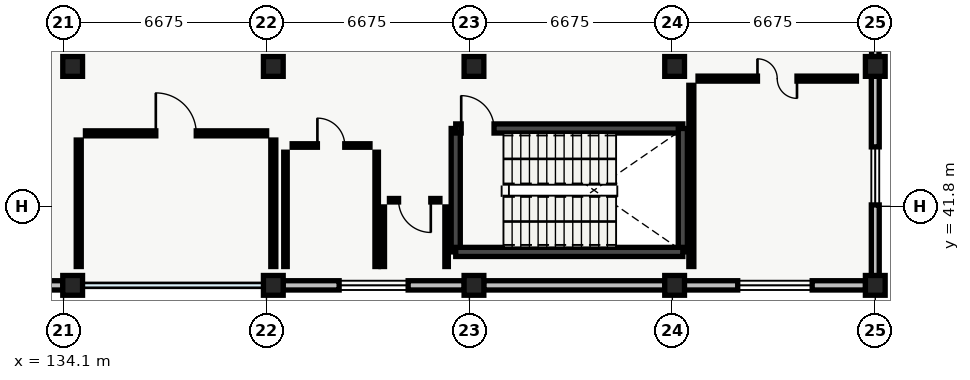
"""IFC4 building model, lengths in metres.
Left out: names, types, materials, properties, quantities, classifications, styles, units other than length and angle.
Written with IfcOpenShell. Run it as: python <this file> out.ifc"""

import sys

from ifc_helpers import new_model, si_unit, direction, frame, frame_2d, origin, origin_2d, place, context, subcontext, project, spatial, rectangle, extrude, element, fill, save


model = new_model("IFC4")
c1 = context("Model", 3, precision=1e-05, world=origin(), true_north=direction((0.0, 1.0)))
c2 = subcontext(c1, "Body", "Model", "MODEL_VIEW")
j1 = project(units=[si_unit("LENGTHUNIT", "METRE"), si_unit("PLANEANGLEUNIT", "RADIAN")], contexts=[c1])
p1 = place(None, origin())
s1 = spatial("IfcSite", under=j1, at=p1, CompositionType="ELEMENT")
p2 = place(p1, origin())
s2 = spatial("IfcBuilding", under=s1, at=p2, CompositionType="ELEMENT")
p3 = place(p2, frame((0.0, 0.0, 18.6)))
s3 = spatial("IfcBuildingStorey", under=s2, at=p3, CompositionType="ELEMENT", Elevation=18.6)
for number, where, z_axis, x_axis in (
    (1, (134.4, 39.2, 0.0), (0.0, 0.0, 1.0), (1.0, 0.0, 0.0)),
    (2, (134.4, 46.4, 0.0), (0.0, 0.0, 1.0), (1.0, 0.0, 0.0)),
    (3, (141.0, 39.2, 0.0), (0.0, 0.0, 1.0), (1.0, 0.0, 0.0)),
    (4, (141.0, 46.4, 0.0), (0.0, 0.0, 1.0), (1.0, 0.0, 0.0)),
    (5, (147.6, 39.2, 0.0), (0.0, 0.0, 1.0), (1.0, 0.0, 0.0)),
    (6, (147.6, 46.4, 0.0), (0.0, 0.0, 1.0), (1.0, 0.0, 0.0)),
    (7, (154.2, 39.2, 0.0), (0.0, 0.0, 1.0), (1.0, 0.0, 0.0)),
    (8, (154.2, 46.4, 0.0), (0.0, 0.0, 1.0), (1.0, 0.0, 0.0)),
    (9, (160.8, 39.2, 0.0), (0.0, 0.0, 1.0), (1.0, 0.0, 0.0)),
    (10, (160.8, 46.4, 0.0), (0.0, 0.0, 1.0), (1.0, 0.0, 0.0)),
):
    element("IfcColumn", number, at=place(p3, frame(where, z_axis=z_axis, x_axis=x_axis)), inside=s3, PredefinedType="COLUMN", context=c2, shape_type="SweptSolid", body=[
        extrude(rectangle(XDim=0.65, YDim=0.65, at=origin_2d()), origin(), (0.0, 0.0, 1.0), 4.3),
    ])
p4 = place(p3, frame((160.8, 53.28, 0.0), z_axis=(0.0, 0.0, 1.0), x_axis=(0.0, -1.0, 0.0)))
e11 = element("IfcWall", 11, at=p4, inside=s3, PredefinedType="STANDARD", context=c2, shape_type="SweptSolid", body=[
    extrude(rectangle(XDim=6.56, YDim=0.245, at=frame_2d((3.28, 0.0))), origin(), (0.0, 0.0, 1.0), 3.835),
])
p5 = place(p4, frame((2.28, 0.0, 0.95)))
e12 = element("IfcOpeningElement", 12, at=p5, cuts=e11, PredefinedType="OPENING", context=c2, shape_type="SweptSolid", body=[
    extrude(rectangle(XDim=2.0, YDim=1.42, at=frame_2d((1.0, 0.71))), frame((0.0, 0.123, 0.0), z_axis=(0.0, -1.0, 0.0), x_axis=(1.0, 0.0, 0.0)), (0.0, 0.0, 1.0), 0.245),
])
p6 = place(p3, frame((160.8, 46.08, 0.0), z_axis=(0.0, 0.0, 1.0), x_axis=(0.0, -1.0, 0.0)))
e13 = element("IfcWall", 13, at=p6, inside=s3, PredefinedType="STANDARD", context=c2, shape_type="SweptSolid", body=[
    extrude(rectangle(XDim=6.56, YDim=0.26, at=frame_2d((3.28, 0.0))), origin(), (0.0, 0.0, 1.0), 3.835),
])
p7 = place(p6, frame((2.325, 0.0, 0.95)))
e14 = element("IfcOpeningElement", 14, at=p7, cuts=e13, PredefinedType="OPENING", context=c2, shape_type="SweptSolid", body=[
    extrude(rectangle(XDim=1.91, YDim=1.4, at=frame_2d((0.955, 0.7))), frame((0.0, 0.13, 0.0), z_axis=(0.0, -1.0, 0.0), x_axis=(1.0, 0.0, 0.0)), (0.0, 0.0, 1.0), 0.26),
])
p8 = place(p3, frame((160.48, 39.2, 0.0), z_axis=(0.0, 0.0, 1.0), x_axis=(-1.0, 0.0, 0.0)))
e15 = element("IfcWall", 15, at=p8, inside=s3, PredefinedType="STANDARD", context=c2, shape_type="SweptSolid", body=[
    extrude(rectangle(XDim=5.96, YDim=0.305, at=frame_2d((2.98, 0.0))), origin(), (0.0, 0.0, 1.0), 3.835),
])
p9 = place(p8, frame((1.755, 0.0, 0.95)))
e16 = element("IfcOpeningElement", 16, at=p9, cuts=e15, PredefinedType="OPENING", context=c2, shape_type="SweptSolid", body=[
    extrude(rectangle(XDim=2.45, YDim=1.38, at=frame_2d((1.225, 0.69))), frame((0.0, 0.152, 0.0), z_axis=(0.0, -1.0, 0.0), x_axis=(1.0, 0.0, 0.0)), (0.0, 0.0, 1.0), 0.305),
])
p10 = place(p3, frame((153.88, 39.2, 0.0), z_axis=(0.0, 0.0, 1.0), x_axis=(-1.0, 0.0, 0.0)))
e17 = element("IfcWall", 17, at=p10, inside=s3, PredefinedType="STANDARD", context=c2, shape_type="SweptSolid", body=[
    extrude(rectangle(XDim=5.96, YDim=0.305, at=frame_2d((2.98, 0.0))), origin(), (0.0, 0.0, 1.0), 3.835),
])
p11 = place(p3, frame((147.28, 39.2, 0.0), z_axis=(0.0, 0.0, 1.0), x_axis=(-1.0, 0.0, 0.0)))
e18 = element("IfcWall", 18, at=p11, inside=s3, PredefinedType="STANDARD", context=c2, shape_type="SweptSolid", body=[
    extrude(rectangle(XDim=5.96, YDim=0.305, at=frame_2d((2.98, 0.0))), origin(), (0.0, 0.0, 1.0), 3.835),
])
p12 = place(p11, frame((1.845, 0.0, 0.95)))
e19 = element("IfcOpeningElement", 19, at=p12, cuts=e18, PredefinedType="OPENING", context=c2, shape_type="SweptSolid", body=[
    extrude(rectangle(XDim=2.27, YDim=1.48, at=frame_2d((1.135, 0.74))), frame((0.0, 0.152, 0.0), z_axis=(0.0, -1.0, 0.0), x_axis=(1.0, 0.0, 0.0)), (0.0, 0.0, 1.0), 0.305),
])
p13 = place(p3, frame((134.08, 39.2, 0.0), z_axis=(0.0, 0.0, 1.0), x_axis=(-1.0, 0.0, 0.0)))
e20 = element("IfcWall", 20, at=p13, inside=s3, PredefinedType="STANDARD", context=c2, shape_type="SweptSolid", body=[
    extrude(rectangle(XDim=5.96, YDim=0.305, at=frame_2d((2.98, 0.0))), origin(), (0.0, 0.0, 1.0), 3.835),
])
p14 = place(p13, frame((1.935, 0.0, 0.95)))
e21 = element("IfcOpeningElement", 21, at=p14, cuts=e20, PredefinedType="OPENING", context=c2, shape_type="SweptSolid", body=[
    extrude(rectangle(XDim=2.09, YDim=1.44, at=frame_2d((1.045, 0.72))), frame((0.0, 0.152, 0.0), z_axis=(0.0, -1.0, 0.0), x_axis=(1.0, 0.0, 0.0)), (0.0, 0.0, 1.0), 0.305),
])
p15 = place(p3, frame((147.0, 40.3, 0.0), z_axis=(0.0, 0.0, 1.0), x_axis=(0.0, 1.0, 0.0)))
e22 = element("IfcWall", 22, at=p15, inside=s3, PredefinedType="SHEAR", context=c2, shape_type="SweptSolid", body=[
    extrude(rectangle(XDim=4.06, YDim=0.3, at=frame_2d((2.03, 0.0))), origin(), (0.0, 0.0, 1.0), 4.28),
])
p16 = place(p3, frame((147.0, 44.36, 0.0), z_axis=(0.0, 0.0, 1.0), x_axis=(1.0, 0.0, 0.0)))
e23 = element("IfcWall", 23, at=p16, inside=s3, PredefinedType="SHEAR", context=c2, shape_type="SweptSolid", body=[
    extrude(rectangle(XDim=7.47, YDim=0.3, at=frame_2d((3.735, 0.0))), origin(), (0.0, 0.0, 1.0), 4.28),
])
p17 = place(p16, frame((0.18, 0.0, 0.0)))
e24 = element("IfcOpeningElement", 24, at=p17, cuts=e23, PredefinedType="OPENING", context=c2, shape_type="SweptSolid", body=[
    extrude(rectangle(XDim=1.08, YDim=2.15, at=frame_2d((0.54, 1.075))), frame((0.0, 0.15, 0.0), z_axis=(0.0, -1.0, 0.0), x_axis=(1.0, 0.0, 0.0)), (0.0, 0.0, 1.0), 0.3),
])
p18 = place(p3, frame((154.47, 44.36, 0.0), z_axis=(0.0, 0.0, 1.0), x_axis=(0.0, -1.0, 0.0)))
e25 = element("IfcWall", 25, at=p18, inside=s3, PredefinedType="SHEAR", context=c2, shape_type="SweptSolid", body=[
    extrude(rectangle(XDim=4.06, YDim=0.3, at=frame_2d((2.03, 0.0))), origin(), (0.0, 0.0, 1.0), 4.28),
])
p19 = place(p3, frame((154.47, 40.3, 0.0), z_axis=(0.0, 0.0, 1.0), x_axis=(-1.0, 0.0, 0.0)))
e26 = element("IfcWall", 26, at=p19, inside=s3, PredefinedType="SHEAR", context=c2, shape_type="SweptSolid", body=[
    extrude(rectangle(XDim=7.47, YDim=0.3, at=frame_2d((3.735, 0.0))), origin(), (0.0, 0.0, 1.0), 4.28),
])
p20 = place(p3, frame((144.4, 39.82, 0.0), z_axis=(0.0, 0.0, 1.0), x_axis=(0.0, 1.0, 0.0)))
e27 = element("IfcWall", 27, at=p20, inside=s3, PredefinedType="PARTITIONING", context=c2, shape_type="SweptSolid", body=[
    extrude(rectangle(XDim=3.76, YDim=0.115, at=frame_2d((1.88, 0.0))), origin(), (0.0, 0.0, 1.0), 3.95),
])
p21 = place(p3, frame((144.18, 43.8, 0.0), z_axis=(0.0, 0.0, 1.0), x_axis=(-1.0, 0.0, 0.0)))
e28 = element("IfcWall", 28, at=p21, inside=s3, PredefinedType="PARTITIONING", context=c2, shape_type="SweptSolid", body=[
    extrude(rectangle(XDim=2.56, YDim=0.115, at=frame_2d((1.28, 0.0))), origin(), (0.0, 0.0, 1.0), 3.95),
])
p22 = place(p21, frame((0.83, 0.0, 0.0)))
e29 = element("IfcOpeningElement", 29, at=p22, cuts=e28, PredefinedType="OPENING", context=c2, shape_type="SweptSolid", body=[
    extrude(rectangle(XDim=0.9, YDim=2.1, at=frame_2d((0.45, 1.05))), frame((0.0, 0.058, 0.0), z_axis=(0.0, -1.0, 0.0), x_axis=(1.0, 0.0, 0.0)), (0.0, 0.0, 1.0), 0.115),
])
p23 = place(p3, frame((141.4, 43.58, 0.0), z_axis=(0.0, 0.0, 1.0), x_axis=(0.0, -1.0, 0.0)))
e30 = element("IfcWall", 30, at=p23, inside=s3, PredefinedType="PARTITIONING", context=c2, shape_type="SweptSolid", body=[
    extrude(rectangle(XDim=3.76, YDim=0.115, at=frame_2d((1.88, 0.0))), origin(), (0.0, 0.0, 1.0), 3.95),
])
p24 = place(p3, frame((146.7, 39.82, 0.0), z_axis=(0.0, 0.0, 1.0), x_axis=(0.0, 1.0, 0.0)))
e31 = element("IfcWall", 31, at=p24, inside=s3, PredefinedType="PARTITIONING", context=c2, shape_type="SweptSolid", body=[
    extrude(rectangle(XDim=1.96, YDim=0.115, at=frame_2d((0.98, 0.0))), origin(), (0.0, 0.0, 1.0), 3.95),
])
p25 = place(p3, frame((146.48, 42.0, 0.0), z_axis=(0.0, 0.0, 1.0), x_axis=(-1.0, 0.0, 0.0)))
e32 = element("IfcWall", 32, at=p25, inside=s3, PredefinedType="PARTITIONING", context=c2, shape_type="SweptSolid", body=[
    extrude(rectangle(XDim=1.66, YDim=0.115, at=frame_2d((0.83, 0.0))), origin(), (0.0, 0.0, 1.0), 3.95),
])
p26 = place(p25, frame((0.3, 0.0, 0.0)))
e33 = element("IfcOpeningElement", 33, at=p26, cuts=e32, PredefinedType="OPENING", context=c2, shape_type="SweptSolid", body=[
    extrude(rectangle(XDim=1.06, YDim=2.12, at=frame_2d((0.53, 1.06))), frame((0.0, 0.058, 0.0), z_axis=(0.0, -1.0, 0.0), x_axis=(1.0, 0.0, 0.0)), (0.0, 0.0, 1.0), 0.115),
])
p27 = place(p3, frame((144.6, 41.78, 0.0), z_axis=(0.0, 0.0, 1.0), x_axis=(0.0, -1.0, 0.0)))
e34 = element("IfcWall", 34, at=p27, inside=s3, PredefinedType="PARTITIONING", context=c2, shape_type="SweptSolid", body=[
    extrude(rectangle(XDim=1.96, YDim=0.115, at=frame_2d((0.98, 0.0))), origin(), (0.0, 0.0, 1.0), 3.95),
])
p28 = place(p3, frame((141.0, 39.82, 0.0), z_axis=(0.0, 0.0, 1.0), x_axis=(0.0, 1.0, 0.0)))
e35 = element("IfcWall", 35, at=p28, inside=s3, PredefinedType="PARTITIONING", context=c2, shape_type="SweptSolid", body=[
    extrude(rectangle(XDim=4.16, YDim=0.165, at=frame_2d((2.08, 0.0))), origin(), (0.0, 0.0, 1.0), 3.685),
])
p29 = place(p3, frame((140.78, 44.2, 0.0), z_axis=(0.0, 0.0, 1.0), x_axis=(-1.0, 0.0, 0.0)))
e36 = element("IfcWall", 36, at=p29, inside=s3, PredefinedType="PARTITIONING", context=c2, shape_type="SweptSolid", body=[
    extrude(rectangle(XDim=5.96, YDim=0.165, at=frame_2d((2.98, 0.0))), origin(), (0.0, 0.0, 1.0), 3.95),
])
p30 = place(p29, frame((2.315, 0.0, 0.0)))
e37 = element("IfcOpeningElement", 37, at=p30, cuts=e36, PredefinedType="OPENING", context=c2, shape_type="SweptSolid", body=[
    extrude(rectangle(XDim=1.33, YDim=2.12, at=frame_2d((0.665, 1.06))), frame((0.0, 0.083, 0.0), z_axis=(0.0, -1.0, 0.0), x_axis=(1.0, 0.0, 0.0)), (0.0, 0.0, 1.0), 0.165),
])
p31 = place(p3, frame((134.6, 43.98, 0.0), z_axis=(0.0, 0.0, 1.0), x_axis=(0.0, -1.0, 0.0)))
e38 = element("IfcWall", 38, at=p31, inside=s3, PredefinedType="PARTITIONING", context=c2, shape_type="SweptSolid", body=[
    extrude(rectangle(XDim=4.16, YDim=0.165, at=frame_2d((2.08, 0.0))), origin(), (0.0, 0.0, 1.0), 3.685),
])
p32 = place(p3, frame((160.18, 46.0, 0.0), z_axis=(0.0, 0.0, 1.0), x_axis=(-1.0, 0.0, 0.0)))
e39 = element("IfcWall", 39, at=p32, inside=s3, PredefinedType="PARTITIONING", context=c2, shape_type="SweptSolid", body=[
    extrude(rectangle(XDim=5.21, YDim=0.165, at=frame_2d((2.605, 0.0))), origin(), (0.0, 0.0, 1.0), 3.95),
])
p33 = place(p32, frame((1.955, 0.0, 0.0)))
e40 = element("IfcOpeningElement", 40, at=p33, cuts=e39, PredefinedType="OPENING", context=c2, shape_type="SweptSolid", body=[
    extrude(rectangle(XDim=1.3, YDim=2.18, at=frame_2d((0.65, 1.09))), frame((0.0, 0.083, 0.0), z_axis=(0.0, -1.0, 0.0), x_axis=(1.0, 0.0, 0.0)), (0.0, 0.0, 1.0), 0.165),
])
p34 = place(p3, frame((154.75, 45.78, 0.0), z_axis=(0.0, 0.0, 1.0), x_axis=(0.0, -1.0, 0.0)))
e41 = element("IfcWall", 41, at=p34, inside=s3, PredefinedType="PARTITIONING", context=c2, shape_type="SweptSolid", body=[
    extrude(rectangle(XDim=5.96, YDim=0.165, at=frame_2d((2.98, 0.0))), origin(), (0.0, 0.0, 1.0), 3.95),
])
p35 = place(p7, origin())
e42 = element("IfcWindow", 42, at=p35, inside=s3, PartitioningType="SINGLE_PANEL", PredefinedType="WINDOW", context=c2, shape_type="SweptSolid", body=[
    extrude(rectangle(XDim=1.91, YDim=1.4, at=frame_2d((0.955, 0.7))), frame((0.0, 0.03, 0.0), z_axis=(0.0, -1.0, 0.0), x_axis=(1.0, 0.0, 0.0)), (0.0, 0.0, 1.0), 0.06),
])
fill(e14, e42)
p36 = place(p9, origin())
e43 = element("IfcWindow", 43, at=p36, inside=s3, PartitioningType="SINGLE_PANEL", PredefinedType="WINDOW", context=c2, shape_type="SweptSolid", body=[
    extrude(rectangle(XDim=2.45, YDim=1.38, at=frame_2d((1.225, 0.69))), frame((0.0, 0.03, 0.0), z_axis=(0.0, -1.0, 0.0), x_axis=(1.0, 0.0, 0.0)), (0.0, 0.0, 1.0), 0.06),
])
fill(e16, e43)
p37 = place(p12, origin())
e44 = element("IfcWindow", 44, at=p37, inside=s3, PartitioningType="SINGLE_PANEL", PredefinedType="WINDOW", context=c2, shape_type="SweptSolid", body=[
    extrude(rectangle(XDim=2.27, YDim=1.48, at=frame_2d((1.135, 0.74))), frame((0.0, 0.03, 0.0), z_axis=(0.0, -1.0, 0.0), x_axis=(1.0, 0.0, 0.0)), (0.0, 0.0, 1.0), 0.06),
])
fill(e19, e44)
p38 = place(p17, origin())
e45 = element("IfcDoor", 45, at=p38, inside=s3, OperationType="SINGLE_SWING_LEFT", PredefinedType="DOOR", context=c2, shape_type="SweptSolid", body=[
    extrude(rectangle(XDim=1.08, YDim=2.15, at=frame_2d((0.54, 1.075))), frame((0.0, 0.025, 0.0), z_axis=(0.0, -1.0, 0.0), x_axis=(1.0, 0.0, 0.0)), (0.0, 0.0, 1.0), 0.05),
])
fill(e24, e45)
p39 = place(p22, origin())
e46 = element("IfcDoor", 46, at=p39, inside=s3, OperationType="SINGLE_SWING_RIGHT", PredefinedType="DOOR", context=c2, shape_type="SweptSolid", body=[
    extrude(rectangle(XDim=0.9, YDim=2.1, at=frame_2d((0.45, 1.05))), frame((0.0, 0.025, 0.0), z_axis=(0.0, -1.0, 0.0), x_axis=(1.0, 0.0, 0.0)), (0.0, 0.0, 1.0), 0.05),
])
fill(e29, e46)
p40 = place(p26, origin())
e47 = element("IfcDoor", 47, at=p40, inside=s3, OperationType="SINGLE_SWING_LEFT", PredefinedType="DOOR", context=c2, shape_type="SweptSolid", body=[
    extrude(rectangle(XDim=1.06, YDim=2.12, at=frame_2d((0.53, 1.06))), frame((0.0, 0.025, 0.0), z_axis=(0.0, -1.0, 0.0), x_axis=(1.0, 0.0, 0.0)), (0.0, 0.0, 1.0), 0.05),
])
fill(e33, e47)
p41 = place(p30, origin())
e48 = element("IfcDoor", 48, at=p41, inside=s3, OperationType="SINGLE_SWING_RIGHT", PredefinedType="DOOR", context=c2, shape_type="SweptSolid", body=[
    extrude(rectangle(XDim=1.33, YDim=2.12, at=frame_2d((0.665, 1.06))), frame((0.0, 0.025, 0.0), z_axis=(0.0, -1.0, 0.0), x_axis=(1.0, 0.0, 0.0)), (0.0, 0.0, 1.0), 0.05),
])
fill(e37, e48)
p42 = place(p33, origin())
e49 = element("IfcDoor", 49, at=p42, inside=s3, OperationType="DOUBLE_DOOR_SINGLE_SWING", PredefinedType="DOOR", context=c2, shape_type="SweptSolid", body=[
    extrude(rectangle(XDim=1.3, YDim=2.18, at=frame_2d((0.65, 1.09))), frame((0.0, 0.025, 0.0), z_axis=(0.0, -1.0, 0.0), x_axis=(1.0, 0.0, 0.0)), (0.0, 0.0, 1.0), 0.05),
])
fill(e40, e49)
save(model, sys.argv[1])
